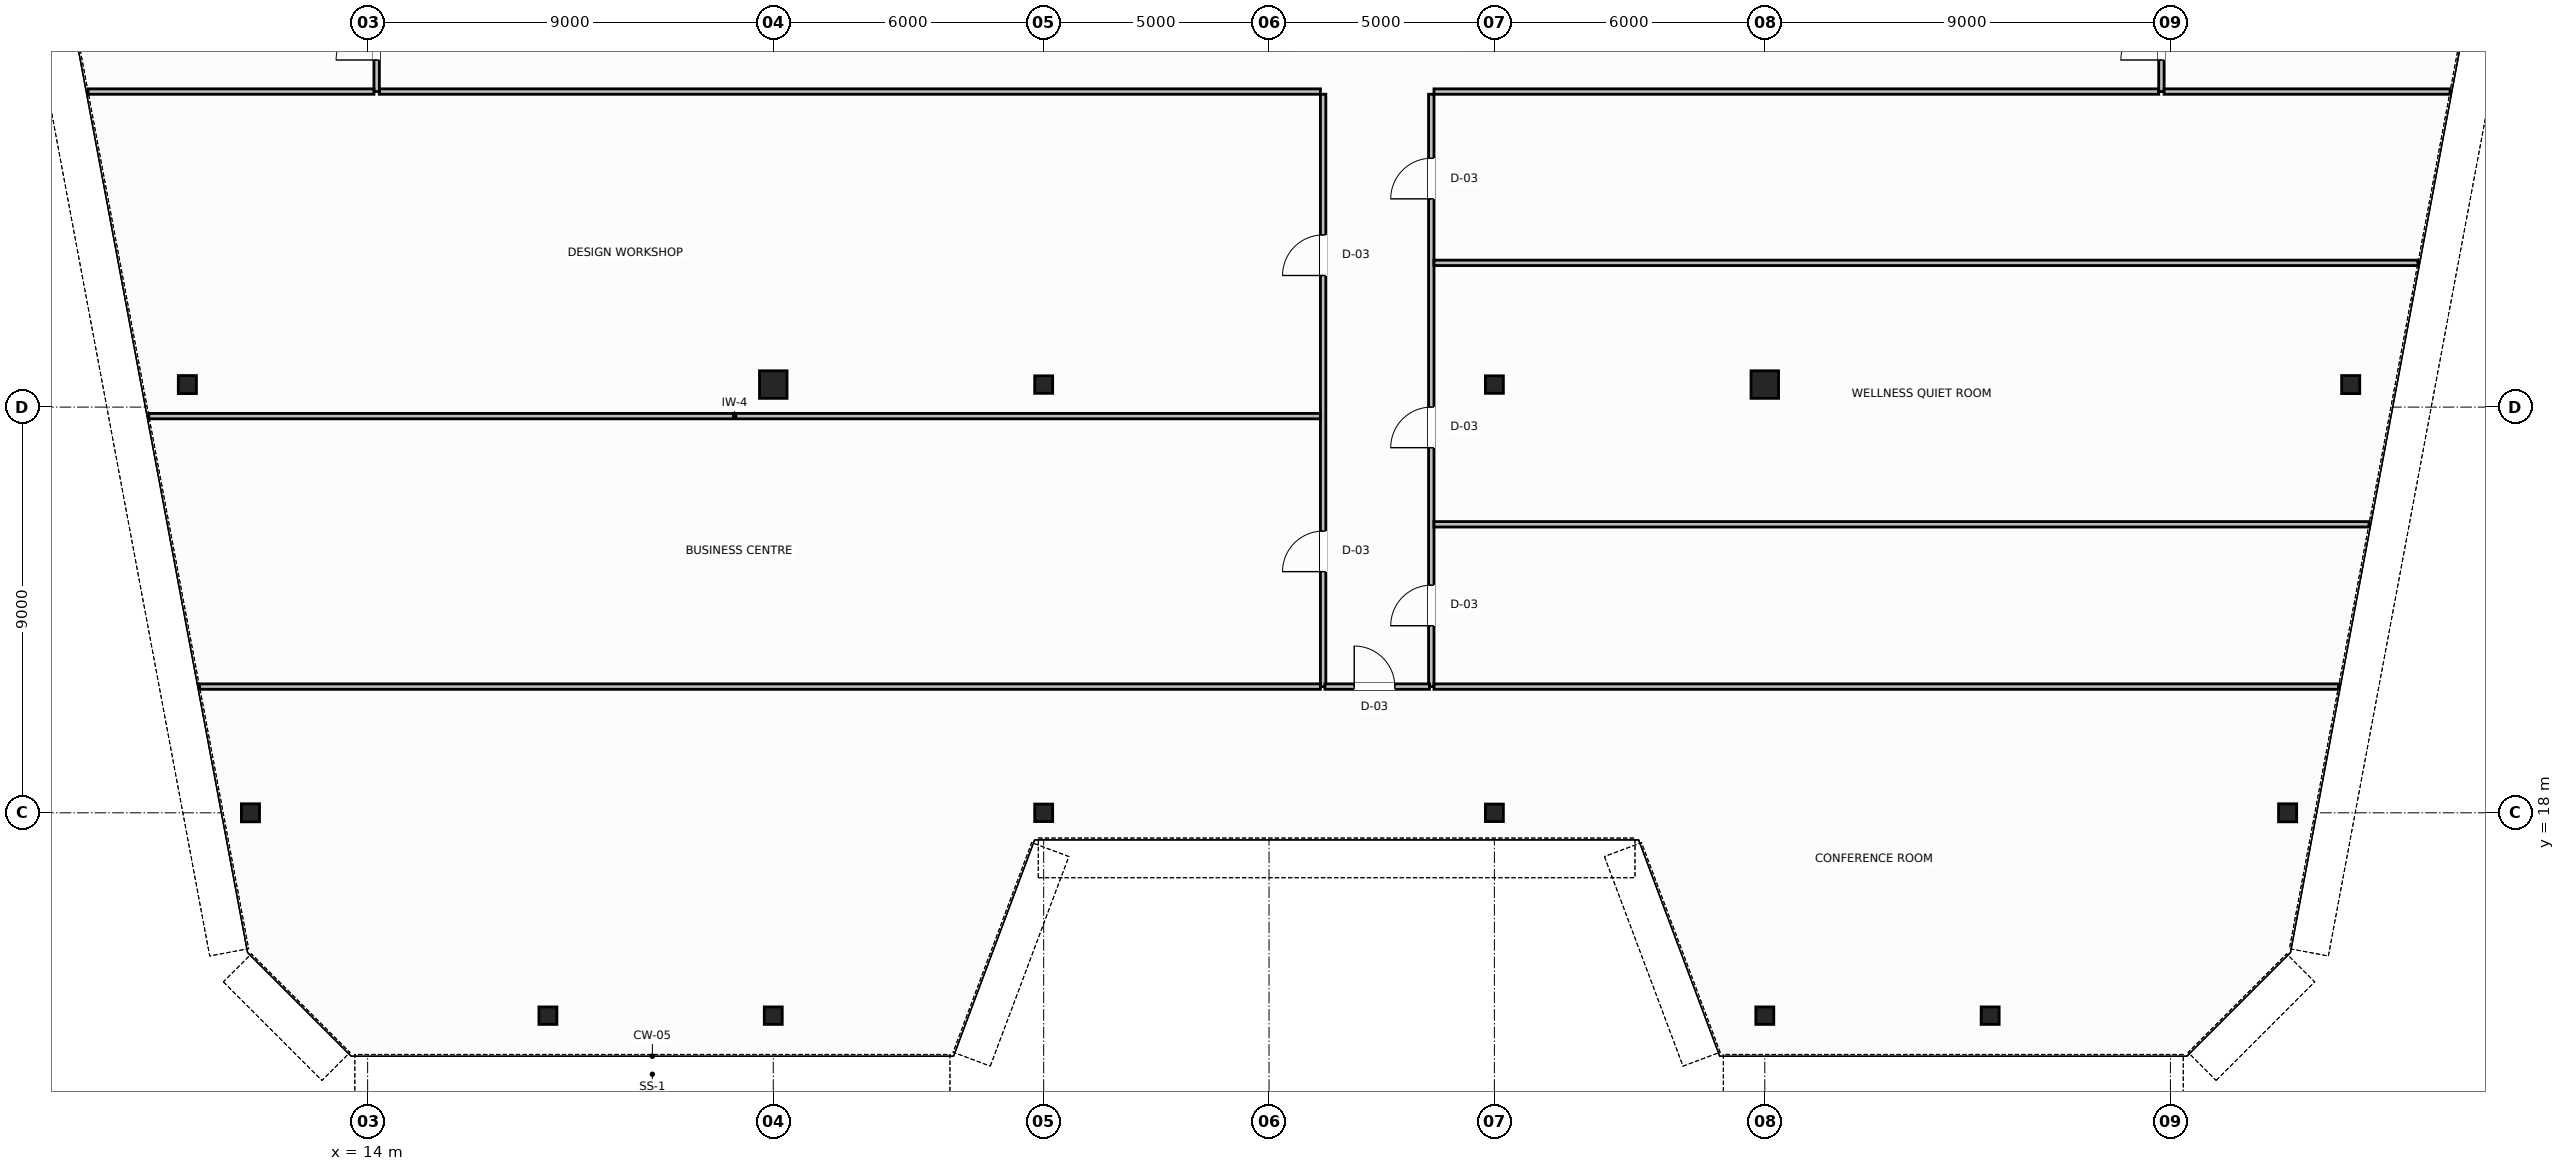
"""IFC4 building model, lengths in metres.
Left out: names, types, materials, properties, quantities, classifications, styles, units other than length and angle.
Written with IfcOpenShell. Run it as: python <this file> out.ifc"""

import sys

from ifc_helpers import new_model, si_unit, direction, frame, frame_2d, origin, origin_2d, place, context, subcontext, project, spatial, rectangle, hollow_circle, i_section, extrude, source, transform, mapped, element, fill, save


model = new_model("IFC4")
c1 = context("Model", 3, precision=1e-05, world=origin(), true_north=direction((0.0, 1.0)))
c2 = subcontext(c1, "Body", "Model", "MODEL_VIEW")
j1 = project(units=[si_unit("LENGTHUNIT", "METRE"), si_unit("PLANEANGLEUNIT", "RADIAN")], contexts=[c1])
p1 = place(None, origin())
s1 = spatial("IfcSite", under=j1, at=p1, CompositionType="ELEMENT")
p2 = place(p1, origin())
s2 = spatial("IfcBuilding", under=s1, at=p2, CompositionType="ELEMENT")
p3 = place(p2, frame((0.0, 0.0, 280.2)))
s3 = spatial("IfcBuildingStorey", under=s2, at=p3, CompositionType="ELEMENT", Elevation=280.2)
m1 = source(origin(), c2, "Body", "SweptSolid", [
    extrude(i_section(OverallWidth=0.401, OverallDepth=0.399, WebThickness=0.025, FlangeThickness=0.035, FilletRadius=0.015, at=origin_2d()), origin(), (0.0, 0.0, 1.0), 3.8),
])
for number, where, z_axis, x_axis in (
    (1, (10.0, 27.5, 0.0), (0.0, 0.0, 1.0), (1.0, 0.0, 0.0)),
    (2, (11.4, 18.0, 0.0), (0.0, 0.0, 1.0), (1.0, 0.0, 0.0)),
    (3, (58.0, 27.5, 0.0), (0.0, 0.0, 1.0), (1.0, 0.0, 0.0)),
    (4, (56.6, 18.0, 0.0), (0.0, 0.0, 1.0), (1.0, 0.0, 0.0)),
):
    element("IfcColumn", number, at=place(p3, frame(where, z_axis=z_axis, x_axis=x_axis)), inside=s3, PredefinedType="COLUMN", context=c2, shape_type="MappedRepresentation", body=[
        mapped(m1, transform((0.0, 0.0, 0.0), scale=1.0)),
    ])
m2 = source(origin(), c2, "Body", "SweptSolid", [
    extrude(hollow_circle(Radius=0.305, WallThickness=0.03, at=origin_2d()), origin(), (0.0, 0.0, 1.0), 3.8),
])
p4 = place(p3, frame((23.0, 27.5, 0.0), z_axis=(0.0, 0.0, 1.0), x_axis=(1.0, 0.0, 0.0)))
e5 = element("IfcColumn", 5, at=p4, inside=s3, PredefinedType="COLUMN", context=c2, shape_type="MappedRepresentation", body=[
    mapped(m2, transform((0.0, 0.0, 0.0), scale=1.0)),
])
m3 = source(origin(), c2, "Body", "SweptSolid", [
    extrude(i_section(OverallWidth=0.398, OverallDepth=0.387, WebThickness=0.021, FlangeThickness=0.029, FilletRadius=0.015, at=origin_2d()), origin(), (0.0, 0.0, 1.0), 3.8),
])
for number, where, z_axis, x_axis in (
    (6, (29.0, 27.5, 0.0), (0.0, 0.0, 1.0), (1.0, 0.0, 0.0)),
    (7, (39.0, 27.5, 0.0), (0.0, 0.0, 1.0), (1.0, 0.0, 0.0)),
):
    element("IfcColumn", number, at=place(p3, frame(where, z_axis=z_axis, x_axis=x_axis)), inside=s3, PredefinedType="COLUMN", context=c2, shape_type="MappedRepresentation", body=[
        mapped(m3, transform((0.0, 0.0, 0.0), scale=1.0)),
    ])
p5 = place(p3, frame((45.0, 27.5, 0.0), z_axis=(0.0, 0.0, 1.0), x_axis=(1.0, 0.0, 0.0)))
e8 = element("IfcColumn", 8, at=p5, inside=s3, PredefinedType="COLUMN", context=c2, shape_type="MappedRepresentation", body=[
    mapped(m2, transform((0.0, 0.0, 0.0), scale=1.0)),
])
for number, where, z_axis, x_axis in (
    (9, (18.0, 13.5, 0.0), (0.0, 0.0, 1.0), (1.0, 0.0, 0.0)),
    (10, (23.0, 13.5, 0.0), (0.0, 0.0, 1.0), (1.0, 0.0, 0.0)),
    (11, (29.0, 18.0, 0.0), (0.0, 0.0, 1.0), (1.0, 0.0, 0.0)),
    (12, (39.0, 18.0, 0.0), (0.0, 0.0, 1.0), (1.0, 0.0, 0.0)),
    (13, (45.0, 13.5, 0.0), (0.0, 0.0, 1.0), (1.0, 0.0, 0.0)),
    (14, (50.0, 13.5, 0.0), (0.0, 0.0, 1.0), (1.0, 0.0, 0.0)),
):
    element("IfcColumn", number, at=place(p3, frame(where, z_axis=z_axis, x_axis=x_axis)), inside=s3, PredefinedType="COLUMN", context=c2, shape_type="MappedRepresentation", body=[
        mapped(m3, transform((0.0, 0.0, 0.0), scale=1.0)),
    ])
p6 = place(p3, frame((14.26, 34.0, 0.0), z_axis=(0.0, 0.0, 1.0), x_axis=(1.0, 0.0, 0.0)))
e15 = element("IfcWall", 15, at=p6, inside=s3, PredefinedType="PARTITIONING", context=c2, shape_type="SweptSolid", body=[
    extrude(rectangle(XDim=20.88, YDim=0.12, at=frame_2d((10.44, 0.0))), origin(), (0.0, 0.0, 1.0), 3.58),
])
p7 = place(p3, frame((37.66, 34.0, 0.0), z_axis=(0.0, 0.0, 1.0), x_axis=(1.0, 0.0, 0.0)))
e16 = element("IfcWall", 16, at=p7, inside=s3, PredefinedType="PARTITIONING", context=c2, shape_type="SweptSolid", body=[
    extrude(rectangle(XDim=16.08, YDim=0.12, at=frame_2d((8.04, 0.0))), origin(), (0.0, 0.0, 1.0), 3.58),
])
p8 = place(p3, frame((14.2, 34.0, 0.0), z_axis=(0.0, 0.0, 1.0), x_axis=(0.0, 1.0, 0.0)))
e17 = element("IfcWall", 17, at=p8, inside=s3, PredefinedType="PARTITIONING", context=c2, shape_type="SweptSolid", body=[
    extrude(rectangle(XDim=2.44, YDim=0.12, at=frame_2d((1.22, 0.0))), origin(), (0.0, 0.0, 1.0), 3.58),
])
p9 = place(p8, frame((0.7, 0.0, 0.0)))
e18 = element("IfcOpeningElement", 18, at=p9, cuts=e17, PredefinedType="OPENING", context=c2, shape_type="SweptSolid", body=[
    extrude(rectangle(XDim=0.9, YDim=2.15, at=frame_2d((0.45, 1.075))), frame((0.0, 0.07, 0.0), z_axis=(0.0, -1.0, 0.0), x_axis=(1.0, 0.0, 0.0)), (0.0, 0.0, 1.0), 0.14),
])
p10 = place(p3, frame((53.8, 34.0, 0.0), z_axis=(0.0, 0.0, 1.0), x_axis=(0.0, 1.0, 0.0)))
e19 = element("IfcWall", 19, at=p10, inside=s3, PredefinedType="PARTITIONING", context=c2, shape_type="SweptSolid", body=[
    extrude(rectangle(XDim=2.44, YDim=0.12, at=frame_2d((1.22, 0.0))), origin(), (0.0, 0.0, 1.0), 3.58),
])
p11 = place(p10, frame((0.7, 0.0, 0.0)))
e20 = element("IfcOpeningElement", 20, at=p11, cuts=e19, PredefinedType="OPENING", context=c2, shape_type="SweptSolid", body=[
    extrude(rectangle(XDim=0.9, YDim=2.15, at=frame_2d((0.45, 1.075))), frame((0.0, 0.07, 0.0), z_axis=(0.0, -1.0, 0.0), x_axis=(1.0, 0.0, 0.0)), (0.0, 0.0, 1.0), 0.14),
])
p12 = place(p3, frame((35.2, 20.8, 0.0), z_axis=(0.0, 0.0, 1.0), x_axis=(0.0, 1.0, 0.0)))
e21 = element("IfcWall", 21, at=p12, inside=s3, PredefinedType="PARTITIONING", context=c2, shape_type="SweptSolid", body=[
    extrude(rectangle(XDim=13.14, YDim=0.12, at=frame_2d((6.57, 0.0))), origin(), (0.0, 0.0, 1.0), 3.58),
])
p13 = place(p12, frame((2.55, 0.0, 0.0)))
e22 = element("IfcOpeningElement", 22, at=p13, cuts=e21, PredefinedType="OPENING", context=c2, shape_type="SweptSolid", body=[
    extrude(rectangle(XDim=0.9, YDim=2.15, at=frame_2d((0.45, 1.075))), frame((0.0, 0.07, 0.0), z_axis=(0.0, -1.0, 0.0), x_axis=(1.0, 0.0, 0.0)), (0.0, 0.0, 1.0), 0.14),
])
p14 = place(p12, frame((9.12, 0.0, 0.0)))
e23 = element("IfcOpeningElement", 23, at=p14, cuts=e21, PredefinedType="OPENING", context=c2, shape_type="SweptSolid", body=[
    extrude(rectangle(XDim=0.9, YDim=2.15, at=frame_2d((0.45, 1.075))), frame((0.0, 0.07, 0.0), z_axis=(0.0, -1.0, 0.0), x_axis=(1.0, 0.0, 0.0)), (0.0, 0.0, 1.0), 0.14),
])
p15 = place(p3, frame((37.6, 20.8, 0.0), z_axis=(0.0, 0.0, 1.0), x_axis=(0.0, 1.0, 0.0)))
e24 = element("IfcWall", 24, at=p15, inside=s3, PredefinedType="PARTITIONING", context=c2, shape_type="SweptSolid", body=[
    extrude(rectangle(XDim=13.14, YDim=0.12, at=frame_2d((6.57, 0.0))), origin(), (0.0, 0.0, 1.0), 3.58),
])
p16 = place(p15, frame((1.35, 0.0, 0.0)))
e25 = element("IfcOpeningElement", 25, at=p16, cuts=e24, PredefinedType="OPENING", context=c2, shape_type="SweptSolid", body=[
    extrude(rectangle(XDim=0.9, YDim=2.15, at=frame_2d((0.45, 1.075))), frame((0.0, 0.07, 0.0), z_axis=(0.0, -1.0, 0.0), x_axis=(1.0, 0.0, 0.0)), (0.0, 0.0, 1.0), 0.14),
])
p17 = place(p15, frame((5.3, 0.0, 0.0)))
e26 = element("IfcOpeningElement", 26, at=p17, cuts=e24, PredefinedType="OPENING", context=c2, shape_type="SweptSolid", body=[
    extrude(rectangle(XDim=0.9, YDim=2.15, at=frame_2d((0.45, 1.075))), frame((0.0, 0.07, 0.0), z_axis=(0.0, -1.0, 0.0), x_axis=(1.0, 0.0, 0.0)), (0.0, 0.0, 1.0), 0.14),
])
p18 = place(p15, frame((10.82, 0.0, 0.0)))
e27 = element("IfcOpeningElement", 27, at=p18, cuts=e24, PredefinedType="OPENING", context=c2, shape_type="SweptSolid", body=[
    extrude(rectangle(XDim=0.9, YDim=2.15, at=frame_2d((0.45, 1.075))), frame((0.0, 0.07, 0.0), z_axis=(0.0, -1.0, 0.0), x_axis=(1.0, 0.0, 0.0)), (0.0, 0.0, 1.0), 0.14),
])
p19 = place(p3, frame((35.24, 20.8, 0.0), z_axis=(0.0, 0.0, 1.0), x_axis=(1.0, 0.0, 0.0)))
e28 = element("IfcWall", 28, at=p19, inside=s3, PredefinedType="PARTITIONING", context=c2, shape_type="SweptSolid", body=[
    extrude(rectangle(XDim=2.32, YDim=0.12, at=frame_2d((1.16, 0.0))), origin(), (0.0, 0.0, 1.0), 3.21),
])
p20 = place(p19, frame((0.65, 0.0, 0.0)))
e29 = element("IfcOpeningElement", 29, at=p20, cuts=e28, PredefinedType="OPENING", context=c2, shape_type="SweptSolid", body=[
    extrude(rectangle(XDim=0.9, YDim=2.15, at=frame_2d((0.45, 1.075))), frame((0.0, 0.07, 0.0), z_axis=(0.0, -1.0, 0.0), x_axis=(1.0, 0.0, 0.0)), (0.0, 0.0, 1.0), 0.14),
])
for number, where, z_axis, x_axis in (
    (30, (7.796, 34.0, 0.0), (0.0, 0.0, 1.0), (1.0, 0.0, 0.0)),
    (31, (53.86, 34.0, 0.0), (0.0, 0.0, 1.0), (1.0, 0.0, 0.0)),
):
    element("IfcWall", number, at=place(p3, frame(where, z_axis=z_axis, x_axis=x_axis)), inside=s3, PredefinedType="PARTITIONING", context=c2, shape_type="SweptSolid", body=[
        extrude(rectangle(XDim=6.344, YDim=0.12, at=frame_2d((3.172, 0.0))), origin(), (0.0, 0.0, 1.0), 3.58),
    ])
p21 = place(p3, frame((9.145, 26.8, 0.0), z_axis=(0.0, 0.0, 1.0), x_axis=(1.0, 0.0, 0.0)))
e32 = element("IfcWall", 32, at=p21, inside=s3, PredefinedType="PARTITIONING", context=c2, shape_type="SweptSolid", body=[
    extrude(rectangle(XDim=25.995, YDim=0.12, at=frame_2d((12.997, 0.0))), origin(), (0.0, 0.0, 1.0), 3.58),
])
p22 = place(p3, frame((37.66, 24.4, 0.0), z_axis=(0.0, 0.0, 1.0), x_axis=(1.0, 0.0, 0.0)))
e33 = element("IfcWall", 33, at=p22, inside=s3, PredefinedType="PARTITIONING", context=c2, shape_type="SweptSolid", body=[
    extrude(rectangle(XDim=20.745, YDim=0.12, at=frame_2d((10.373, 0.0))), origin(), (0.0, 0.0, 1.0), 3.58),
])
p23 = place(p3, frame((37.66, 30.2, 0.0), z_axis=(0.0, 0.0, 1.0), x_axis=(1.0, 0.0, 0.0)))
e34 = element("IfcWall", 34, at=p23, inside=s3, PredefinedType="PARTITIONING", context=c2, shape_type="SweptSolid", body=[
    extrude(rectangle(XDim=21.832, YDim=0.12, at=frame_2d((10.916, 0.0))), origin(), (0.0, 0.0, 1.0), 3.21),
])
p24 = place(p3, frame((10.27, 20.8, 0.0), z_axis=(0.0, 0.0, 1.0), x_axis=(1.0, 0.0, 0.0)))
e35 = element("IfcWall", 35, at=p24, inside=s3, PredefinedType="PARTITIONING", context=c2, shape_type="SweptSolid", body=[
    extrude(rectangle(XDim=24.87, YDim=0.12, at=frame_2d((12.435, 0.0))), origin(), (0.0, 0.0, 1.0), 3.21),
])
p25 = place(p3, frame((37.66, 20.8, 0.0), z_axis=(0.0, 0.0, 1.0), x_axis=(1.0, 0.0, 0.0)))
e36 = element("IfcWall", 36, at=p25, inside=s3, PredefinedType="PARTITIONING", context=c2, shape_type="SweptSolid", body=[
    extrude(rectangle(XDim=20.07, YDim=0.12, at=frame_2d((10.035, 0.0))), origin(), (0.0, 0.0, 1.0), 3.21),
])
m4 = source(origin(), c2, "Body", "SweptSolid", [
    extrude(rectangle(XDim=0.9, YDim=2.15, at=frame_2d((0.45, 1.075))), frame((0.0, 0.025, 0.0), z_axis=(0.0, -1.0, 0.0), x_axis=(1.0, 0.0, 0.0)), (0.0, 0.0, 1.0), 0.05),
])
p26 = place(p9, origin())
e37 = element("IfcDoor", 37, at=p26, inside=s3, OperationType="SINGLE_SWING_LEFT", PredefinedType="DOOR", context=c2, shape_type="MappedRepresentation", body=[
    mapped(m4, transform((0.0, 0.0, 0.0), scale=1.0)),
])
fill(e18, e37)
p27 = place(p11, origin())
e38 = element("IfcDoor", 38, at=p27, inside=s3, OperationType="SINGLE_SWING_RIGHT", PredefinedType="DOOR", context=c2, shape_type="MappedRepresentation", body=[
    mapped(m4, transform((0.0, 0.0, 0.0), scale=1.0)),
])
fill(e20, e38)
p28 = place(p13, origin())
e39 = element("IfcDoor", 39, at=p28, inside=s3, OperationType="SINGLE_SWING_LEFT", PredefinedType="DOOR", context=c2, shape_type="MappedRepresentation", body=[
    mapped(m4, transform((0.0, 0.0, 0.0), scale=1.0)),
])
fill(e22, e39)
p29 = place(p14, origin())
e40 = element("IfcDoor", 40, at=p29, inside=s3, OperationType="SINGLE_SWING_RIGHT", PredefinedType="DOOR", context=c2, shape_type="MappedRepresentation", body=[
    mapped(m4, transform((0.0, 0.0, 0.0), scale=1.0)),
])
fill(e23, e40)
p30 = place(p16, origin())
e41 = element("IfcDoor", 41, at=p30, inside=s3, OperationType="SINGLE_SWING_RIGHT", PredefinedType="DOOR", context=c2, shape_type="MappedRepresentation", body=[
    mapped(m4, transform((0.0, 0.0, 0.0), scale=1.0)),
])
fill(e25, e41)
p31 = place(p17, origin())
e42 = element("IfcDoor", 42, at=p31, inside=s3, OperationType="SINGLE_SWING_LEFT", PredefinedType="DOOR", context=c2, shape_type="MappedRepresentation", body=[
    mapped(m4, transform((0.0, 0.0, 0.0), scale=1.0)),
])
fill(e26, e42)
p32 = place(p18, origin())
e43 = element("IfcDoor", 43, at=p32, inside=s3, OperationType="SINGLE_SWING_RIGHT", PredefinedType="DOOR", context=c2, shape_type="MappedRepresentation", body=[
    mapped(m4, transform((0.0, 0.0, 0.0), scale=1.0)),
])
fill(e27, e43)
p33 = place(p20, origin())
e44 = element("IfcDoor", 44, at=p33, inside=s3, OperationType="SINGLE_SWING_LEFT", PredefinedType="DOOR", context=c2, shape_type="MappedRepresentation", body=[
    mapped(m4, transform((0.0, 0.0, 0.0), scale=1.0)),
])
fill(e29, e44)
save(model, sys.argv[1])
